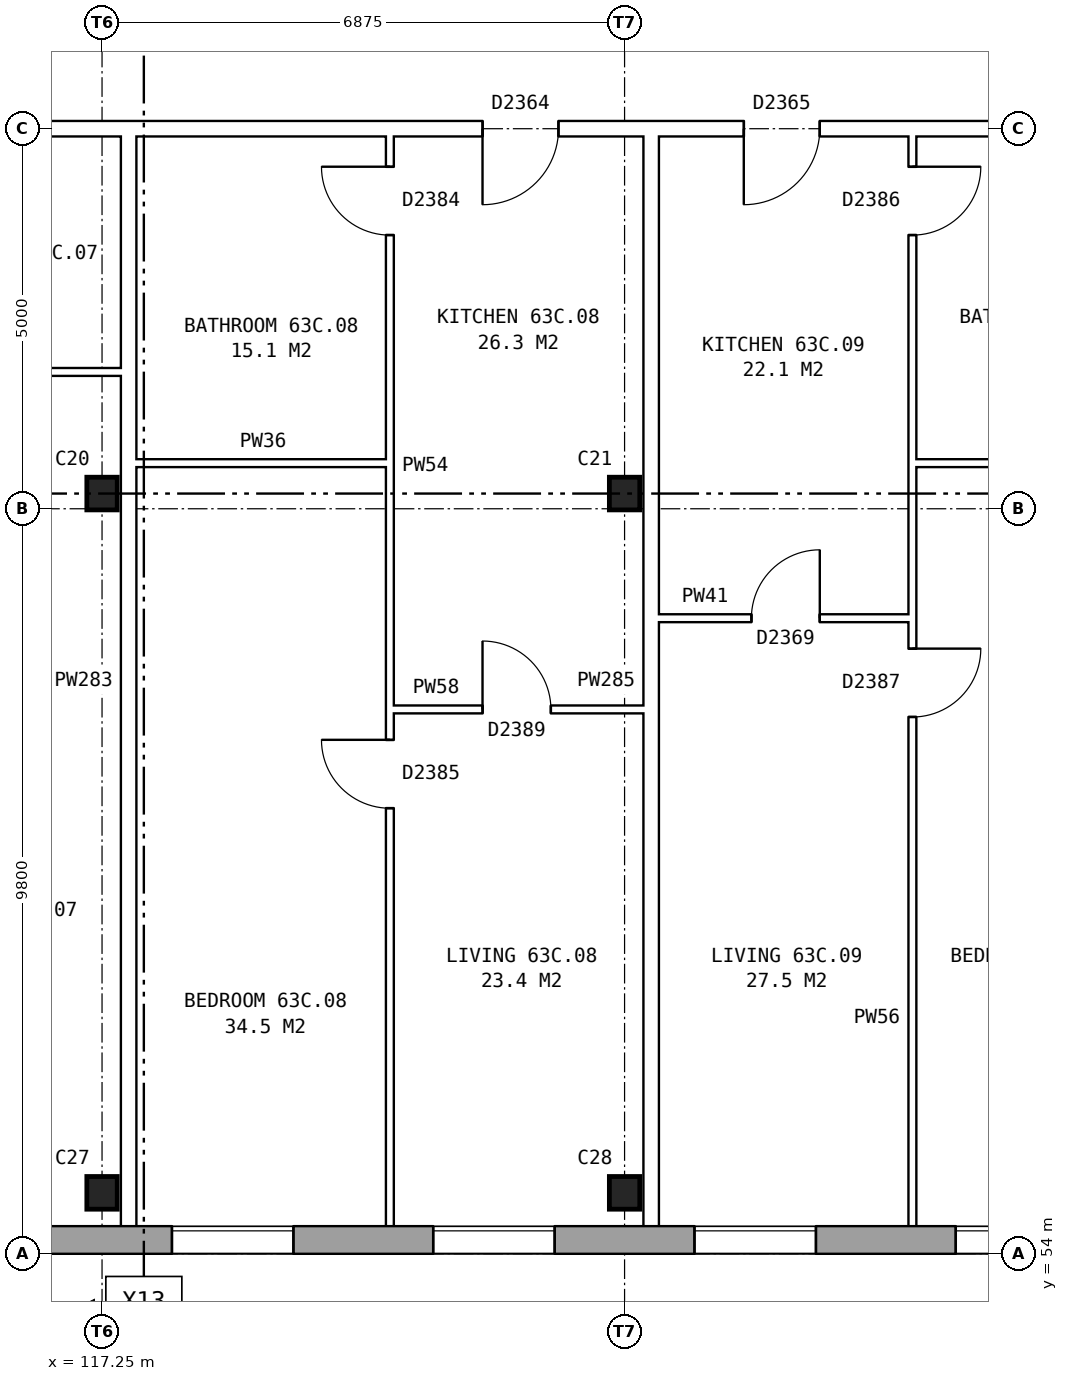
"""IFC4 building model, lengths in metres.
Left out: names, types, materials, properties, quantities, classifications, styles, units other than length and angle.
Written with IfcOpenShell. Run it as: python <this file> out.ifc"""

import sys

from ifc_helpers import new_model, si_unit, direction, frame, frame_2d, origin, origin_2d, place, context, subcontext, project, spatial, rectangle, i_section, extrude, element, fill, save


model = new_model("IFC4")
c1 = context("Model", 3, precision=1e-05, world=origin(), true_north=direction((0.0, 1.0)))
c2 = subcontext(c1, "Body", "Model", "MODEL_VIEW")
j1 = project(units=[si_unit("LENGTHUNIT", "METRE"), si_unit("PLANEANGLEUNIT", "RADIAN")], contexts=[c1])
p1 = place(None, origin())
s1 = spatial("IfcSite", under=j1, at=p1, CompositionType="ELEMENT")
p2 = place(p1, origin())
s2 = spatial("IfcBuilding", under=s1, at=p2, CompositionType="ELEMENT")
p3 = place(p2, frame((0.0, 0.0, 224.5)))
s3 = spatial("IfcBuildingStorey", under=s2, at=p3, CompositionType="ELEMENT", Elevation=224.5)
for number, where, z_axis, x_axis in (
    (1, (117.25, 54.8, 0.0), (0.0, 0.0, 1.0), (1.0, 0.0, 0.0)),
    (2, (124.125, 54.8, 0.0), (0.0, 0.0, 1.0), (1.0, 0.0, 0.0)),
    (3, (117.25, 64.0, 0.0), (0.0, 0.0, 1.0), (1.0, 0.0, 0.0)),
    (4, (124.125, 64.0, 0.0), (0.0, 0.0, 1.0), (1.0, 0.0, 0.0)),
):
    element("IfcColumn", number, at=place(p3, frame(where, z_axis=z_axis, x_axis=x_axis)), inside=s3, PredefinedType="COLUMN", context=c2, shape_type="SweptSolid", body=[
        extrude(i_section(OverallWidth=0.4, OverallDepth=0.43, WebThickness=0.04, FlangeThickness=0.04, at=origin_2d()), origin(), (0.0, 0.0, 1.0), 2.85),
    ])
p4 = place(p3, frame((75.95, 54.18, 0.0), z_axis=(0.0, 0.0, 1.0), x_axis=(1.0, 0.0, 0.0)))
e5 = element("IfcWall", 5, at=p4, inside=s3, PredefinedType="STANDARD", context=c2, shape_type="SweptSolid", body=[
    extrude(rectangle(XDim=55.1, YDim=0.36, at=frame_2d((27.55, 0.0))), origin(), (0.0, 0.0, 1.0), 2.85),
])
p5 = place(p4, frame((0.969, 0.0, 0.8)))
e6 = element("IfcOpeningElement", 6, at=p5, cuts=e5, PredefinedType="OPENING", context=c2, shape_type="SweptSolid", body=[
    extrude(rectangle(XDim=1.6, YDim=1.8, at=frame_2d((0.8, 0.9))), frame((0.0, 0.19, 0.0), z_axis=(0.0, -1.0, 0.0), x_axis=(1.0, 0.0, 0.0)), (0.0, 0.0, 1.0), 0.38),
])
p6 = place(p4, frame((4.406, 0.0, 0.8)))
e7 = element("IfcOpeningElement", 7, at=p6, cuts=e5, PredefinedType="OPENING", context=c2, shape_type="SweptSolid", body=[
    extrude(rectangle(XDim=1.6, YDim=1.8, at=frame_2d((0.8, 0.9))), frame((0.0, 0.19, 0.0), z_axis=(0.0, -1.0, 0.0), x_axis=(1.0, 0.0, 0.0)), (0.0, 0.0, 1.0), 0.38),
])
p7 = place(p4, frame((7.844, 0.0, 0.8)))
e8 = element("IfcOpeningElement", 8, at=p7, cuts=e5, PredefinedType="OPENING", context=c2, shape_type="SweptSolid", body=[
    extrude(rectangle(XDim=1.6, YDim=1.8, at=frame_2d((0.8, 0.9))), frame((0.0, 0.19, 0.0), z_axis=(0.0, -1.0, 0.0), x_axis=(1.0, 0.0, 0.0)), (0.0, 0.0, 1.0), 0.38),
])
p8 = place(p4, frame((11.281, 0.0, 0.8)))
e9 = element("IfcOpeningElement", 9, at=p8, cuts=e5, PredefinedType="OPENING", context=c2, shape_type="SweptSolid", body=[
    extrude(rectangle(XDim=1.6, YDim=1.8, at=frame_2d((0.8, 0.9))), frame((0.0, 0.19, 0.0), z_axis=(0.0, -1.0, 0.0), x_axis=(1.0, 0.0, 0.0)), (0.0, 0.0, 1.0), 0.38),
])
p9 = place(p4, frame((14.719, 0.0, 0.8)))
e10 = element("IfcOpeningElement", 10, at=p9, cuts=e5, PredefinedType="OPENING", context=c2, shape_type="SweptSolid", body=[
    extrude(rectangle(XDim=1.6, YDim=1.8, at=frame_2d((0.8, 0.9))), frame((0.0, 0.19, 0.0), z_axis=(0.0, -1.0, 0.0), x_axis=(1.0, 0.0, 0.0)), (0.0, 0.0, 1.0), 0.38),
])
p10 = place(p4, frame((18.156, 0.0, 0.8)))
e11 = element("IfcOpeningElement", 11, at=p10, cuts=e5, PredefinedType="OPENING", context=c2, shape_type="SweptSolid", body=[
    extrude(rectangle(XDim=1.6, YDim=1.8, at=frame_2d((0.8, 0.9))), frame((0.0, 0.19, 0.0), z_axis=(0.0, -1.0, 0.0), x_axis=(1.0, 0.0, 0.0)), (0.0, 0.0, 1.0), 0.38),
])
p11 = place(p4, frame((21.594, 0.0, 0.8)))
e12 = element("IfcOpeningElement", 12, at=p11, cuts=e5, PredefinedType="OPENING", context=c2, shape_type="SweptSolid", body=[
    extrude(rectangle(XDim=1.6, YDim=1.8, at=frame_2d((0.8, 0.9))), frame((0.0, 0.19, 0.0), z_axis=(0.0, -1.0, 0.0), x_axis=(1.0, 0.0, 0.0)), (0.0, 0.0, 1.0), 0.38),
])
p12 = place(p4, frame((25.031, 0.0, 0.8)))
e13 = element("IfcOpeningElement", 13, at=p12, cuts=e5, PredefinedType="OPENING", context=c2, shape_type="SweptSolid", body=[
    extrude(rectangle(XDim=1.6, YDim=1.8, at=frame_2d((0.8, 0.9))), frame((0.0, 0.19, 0.0), z_axis=(0.0, -1.0, 0.0), x_axis=(1.0, 0.0, 0.0)), (0.0, 0.0, 1.0), 0.38),
])
p13 = place(p4, frame((28.469, 0.0, 0.8)))
e14 = element("IfcOpeningElement", 14, at=p13, cuts=e5, PredefinedType="OPENING", context=c2, shape_type="SweptSolid", body=[
    extrude(rectangle(XDim=1.6, YDim=1.8, at=frame_2d((0.8, 0.9))), frame((0.0, 0.19, 0.0), z_axis=(0.0, -1.0, 0.0), x_axis=(1.0, 0.0, 0.0)), (0.0, 0.0, 1.0), 0.38),
])
p14 = place(p4, frame((31.906, 0.0, 0.8)))
e15 = element("IfcOpeningElement", 15, at=p14, cuts=e5, PredefinedType="OPENING", context=c2, shape_type="SweptSolid", body=[
    extrude(rectangle(XDim=1.6, YDim=1.8, at=frame_2d((0.8, 0.9))), frame((0.0, 0.19, 0.0), z_axis=(0.0, -1.0, 0.0), x_axis=(1.0, 0.0, 0.0)), (0.0, 0.0, 1.0), 0.38),
])
p15 = place(p4, frame((35.344, 0.0, 0.8)))
e16 = element("IfcOpeningElement", 16, at=p15, cuts=e5, PredefinedType="OPENING", context=c2, shape_type="SweptSolid", body=[
    extrude(rectangle(XDim=1.6, YDim=1.8, at=frame_2d((0.8, 0.9))), frame((0.0, 0.19, 0.0), z_axis=(0.0, -1.0, 0.0), x_axis=(1.0, 0.0, 0.0)), (0.0, 0.0, 1.0), 0.38),
])
p16 = place(p4, frame((38.781, 0.0, 0.8)))
e17 = element("IfcOpeningElement", 17, at=p16, cuts=e5, PredefinedType="OPENING", context=c2, shape_type="SweptSolid", body=[
    extrude(rectangle(XDim=1.6, YDim=1.8, at=frame_2d((0.8, 0.9))), frame((0.0, 0.19, 0.0), z_axis=(0.0, -1.0, 0.0), x_axis=(1.0, 0.0, 0.0)), (0.0, 0.0, 1.0), 0.38),
])
p17 = place(p4, frame((42.219, 0.0, 0.8)))
e18 = element("IfcOpeningElement", 18, at=p17, cuts=e5, PredefinedType="OPENING", context=c2, shape_type="SweptSolid", body=[
    extrude(rectangle(XDim=1.6, YDim=1.8, at=frame_2d((0.8, 0.9))), frame((0.0, 0.19, 0.0), z_axis=(0.0, -1.0, 0.0), x_axis=(1.0, 0.0, 0.0)), (0.0, 0.0, 1.0), 0.38),
])
p18 = place(p4, frame((45.656, 0.0, 0.8)))
e19 = element("IfcOpeningElement", 19, at=p18, cuts=e5, PredefinedType="OPENING", context=c2, shape_type="SweptSolid", body=[
    extrude(rectangle(XDim=1.6, YDim=1.8, at=frame_2d((0.8, 0.9))), frame((0.0, 0.19, 0.0), z_axis=(0.0, -1.0, 0.0), x_axis=(1.0, 0.0, 0.0)), (0.0, 0.0, 1.0), 0.38),
])
p19 = place(p4, frame((49.094, 0.0, 0.8)))
e20 = element("IfcOpeningElement", 20, at=p19, cuts=e5, PredefinedType="OPENING", context=c2, shape_type="SweptSolid", body=[
    extrude(rectangle(XDim=1.6, YDim=1.8, at=frame_2d((0.8, 0.9))), frame((0.0, 0.19, 0.0), z_axis=(0.0, -1.0, 0.0), x_axis=(1.0, 0.0, 0.0)), (0.0, 0.0, 1.0), 0.38),
])
p20 = place(p4, frame((52.531, 0.0, 0.8)))
e21 = element("IfcOpeningElement", 21, at=p20, cuts=e5, PredefinedType="OPENING", context=c2, shape_type="SweptSolid", body=[
    extrude(rectangle(XDim=1.6, YDim=1.8, at=frame_2d((0.8, 0.9))), frame((0.0, 0.19, 0.0), z_axis=(0.0, -1.0, 0.0), x_axis=(1.0, 0.0, 0.0)), (0.0, 0.0, 1.0), 0.38),
])
p21 = place(p3, frame((121.037, 61.16, 0.0), z_axis=(0.0, 0.0, 1.0), x_axis=(1.0, 0.0, 0.0)))
e22 = element("IfcWall", 22, at=p21, inside=s3, PredefinedType="PARTITIONING", context=c2, shape_type="SweptSolid", body=[
    extrude(rectangle(XDim=3.338, YDim=0.1, at=frame_2d((1.669, 0.0))), origin(), (0.0, 0.0, 1.0), 2.85),
])
p22 = place(p21, frame((1.219, 0.0, 0.0)))
e23 = element("IfcOpeningElement", 23, at=p22, cuts=e22, PredefinedType="OPENING", context=c2, shape_type="SweptSolid", body=[
    extrude(rectangle(XDim=0.9, YDim=2.1, at=frame_2d((0.45, 1.05))), frame((0.0, 0.06, 0.0), z_axis=(0.0, -1.0, 0.0), x_axis=(1.0, 0.0, 0.0)), (0.0, 0.0, 1.0), 0.12),
])
p23 = place(p3, frame((124.575, 62.36, 0.0), z_axis=(0.0, 0.0, 1.0), x_axis=(1.0, 0.0, 0.0)))
e24 = element("IfcWall", 24, at=p23, inside=s3, PredefinedType="PARTITIONING", context=c2, shape_type="SweptSolid", body=[
    extrude(rectangle(XDim=3.337, YDim=0.1, at=frame_2d((1.668, 0.0))), origin(), (0.0, 0.0, 1.0), 2.85),
])
p24 = place(p23, frame((1.219, 0.0, 0.0)))
e25 = element("IfcOpeningElement", 25, at=p24, cuts=e24, PredefinedType="OPENING", context=c2, shape_type="SweptSolid", body=[
    extrude(rectangle(XDim=0.9, YDim=2.1, at=frame_2d((0.45, 1.05))), frame((0.0, 0.06, 0.0), z_axis=(0.0, -1.0, 0.0), x_axis=(1.0, 0.0, 0.0)), (0.0, 0.0, 1.0), 0.12),
])
p25 = place(p3, frame((117.7, 64.4, 0.0), z_axis=(0.0, 0.0, 1.0), x_axis=(1.0, 0.0, 0.0)))
e26 = element("IfcWall", 26, at=p25, inside=s3, PredefinedType="PARTITIONING", context=c2, shape_type="SweptSolid", body=[
    extrude(rectangle(XDim=3.337, YDim=0.1, at=frame_2d((1.668, 0.0))), origin(), (0.0, 0.0, 1.0), 2.85),
])
p26 = place(p3, frame((127.912, 64.4, 0.0), z_axis=(0.0, 0.0, 1.0), x_axis=(1.0, 0.0, 0.0)))
e27 = element("IfcWall", 27, at=p26, inside=s3, PredefinedType="PARTITIONING", context=c2, shape_type="SweptSolid", body=[
    extrude(rectangle(XDim=3.448, YDim=0.1, at=frame_2d((1.724, 0.0))), origin(), (0.0, 0.0, 1.0), 2.85),
])
p27 = place(p3, frame((114.162, 65.6, 0.0), z_axis=(0.0, 0.0, 1.0), x_axis=(1.0, 0.0, 0.0)))
e28 = element("IfcWall", 28, at=p27, inside=s3, PredefinedType="PARTITIONING", context=c2, shape_type="SweptSolid", body=[
    extrude(rectangle(XDim=3.338, YDim=0.1, at=frame_2d((1.669, 0.0))), origin(), (0.0, 0.0, 1.0), 2.85),
])
p28 = place(p3, frame((75.64, 68.8, 0.0), z_axis=(0.0, 0.0, 1.0), x_axis=(1.0, 0.0, 0.0)))
e29 = element("IfcWall", 29, at=p28, inside=s3, PredefinedType="PARTITIONING", context=c2, shape_type="SweptSolid", body=[
    extrude(rectangle(XDim=55.72, YDim=0.2, at=frame_2d((27.86, 0.0))), origin(), (0.0, 0.0, 1.0), 2.85),
])
p29 = place(p28, frame((1.399, 0.0, 0.0)))
e30 = element("IfcOpeningElement", 30, at=p29, cuts=e29, PredefinedType="OPENING", context=c2, shape_type="SweptSolid", body=[
    extrude(rectangle(XDim=1.0, YDim=2.1, at=frame_2d((0.5, 1.05))), frame((0.0, 0.11, 0.0), z_axis=(0.0, -1.0, 0.0), x_axis=(1.0, 0.0, 0.0)), (0.0, 0.0, 1.0), 0.22),
])
p30 = place(p28, frame((12.241, 0.0, 0.0)))
e31 = element("IfcOpeningElement", 31, at=p30, cuts=e29, PredefinedType="OPENING", context=c2, shape_type="SweptSolid", body=[
    extrude(rectangle(XDim=1.0, YDim=2.1, at=frame_2d((0.5, 1.05))), frame((0.0, 0.11, 0.0), z_axis=(0.0, -1.0, 0.0), x_axis=(1.0, 0.0, 0.0)), (0.0, 0.0, 1.0), 0.22),
])
p31 = place(p28, frame((22.553, 0.0, 0.0)))
e32 = element("IfcOpeningElement", 32, at=p31, cuts=e29, PredefinedType="OPENING", context=c2, shape_type="SweptSolid", body=[
    extrude(rectangle(XDim=1.0, YDim=2.1, at=frame_2d((0.5, 1.05))), frame((0.0, 0.11, 0.0), z_axis=(0.0, -1.0, 0.0), x_axis=(1.0, 0.0, 0.0)), (0.0, 0.0, 1.0), 0.22),
])
p32 = place(p28, frame((32.866, 0.0, 0.0)))
e33 = element("IfcOpeningElement", 33, at=p32, cuts=e29, PredefinedType="OPENING", context=c2, shape_type="SweptSolid", body=[
    extrude(rectangle(XDim=1.0, YDim=2.1, at=frame_2d((0.5, 1.05))), frame((0.0, 0.11, 0.0), z_axis=(0.0, -1.0, 0.0), x_axis=(1.0, 0.0, 0.0)), (0.0, 0.0, 1.0), 0.22),
])
p33 = place(p28, frame((36.303, 0.0, 0.0)))
e34 = element("IfcOpeningElement", 34, at=p33, cuts=e29, PredefinedType="OPENING", context=c2, shape_type="SweptSolid", body=[
    extrude(rectangle(XDim=1.0, YDim=2.1, at=frame_2d((0.5, 1.05))), frame((0.0, 0.11, 0.0), z_axis=(0.0, -1.0, 0.0), x_axis=(1.0, 0.0, 0.0)), (0.0, 0.0, 1.0), 0.22),
])
p34 = place(p28, frame((46.616, 0.0, 0.0)))
e35 = element("IfcOpeningElement", 35, at=p34, cuts=e29, PredefinedType="OPENING", context=c2, shape_type="SweptSolid", body=[
    extrude(rectangle(XDim=1.0, YDim=2.1, at=frame_2d((0.5, 1.05))), frame((0.0, 0.11, 0.0), z_axis=(0.0, -1.0, 0.0), x_axis=(1.0, 0.0, 0.0)), (0.0, 0.0, 1.0), 0.22),
])
p35 = place(p28, frame((50.053, 0.0, 0.0)))
e36 = element("IfcOpeningElement", 36, at=p35, cuts=e29, PredefinedType="OPENING", context=c2, shape_type="SweptSolid", body=[
    extrude(rectangle(XDim=1.0, YDim=2.1, at=frame_2d((0.5, 1.05))), frame((0.0, 0.11, 0.0), z_axis=(0.0, -1.0, 0.0), x_axis=(1.0, 0.0, 0.0)), (0.0, 0.0, 1.0), 0.22),
])
p36 = place(p3, frame((117.6, 54.36, 0.0), z_axis=(0.0, 0.0, 1.0), x_axis=(0.0, 1.0, 0.0)))
e37 = element("IfcWall", 37, at=p36, inside=s3, PredefinedType="PARTITIONING", context=c2, shape_type="SweptSolid", body=[
    extrude(rectangle(XDim=14.34, YDim=0.2, at=frame_2d((7.17, 0.0))), origin(), (0.0, 0.0, 1.0), 2.85),
])
p37 = place(p3, frame((121.037, 54.36, 0.0), z_axis=(0.0, 0.0, 1.0), x_axis=(0.0, 1.0, 0.0)))
e38 = element("IfcWall", 38, at=p37, inside=s3, PredefinedType="PARTITIONING", context=c2, shape_type="SweptSolid", body=[
    extrude(rectangle(XDim=14.34, YDim=0.1, at=frame_2d((7.17, 0.0))), origin(), (0.0, 0.0, 1.0), 2.85),
])
p38 = place(p37, frame((5.5, 0.0, 0.0)))
e39 = element("IfcOpeningElement", 39, at=p38, cuts=e38, PredefinedType="OPENING", context=c2, shape_type="SweptSolid", body=[
    extrude(rectangle(XDim=0.9, YDim=2.1, at=frame_2d((0.45, 1.05))), frame((0.0, 0.06, 0.0), z_axis=(0.0, -1.0, 0.0), x_axis=(1.0, 0.0, 0.0)), (0.0, 0.0, 1.0), 0.12),
])
p39 = place(p37, frame((13.04, 0.0, 0.0)))
e40 = element("IfcOpeningElement", 40, at=p39, cuts=e38, PredefinedType="OPENING", context=c2, shape_type="SweptSolid", body=[
    extrude(rectangle(XDim=0.9, YDim=2.1, at=frame_2d((0.45, 1.05))), frame((0.0, 0.06, 0.0), z_axis=(0.0, -1.0, 0.0), x_axis=(1.0, 0.0, 0.0)), (0.0, 0.0, 1.0), 0.12),
])
p40 = place(p3, frame((124.475, 54.36, 0.0), z_axis=(0.0, 0.0, 1.0), x_axis=(0.0, 1.0, 0.0)))
e41 = element("IfcWall", 41, at=p40, inside=s3, PredefinedType="PARTITIONING", context=c2, shape_type="SweptSolid", body=[
    extrude(rectangle(XDim=14.34, YDim=0.2, at=frame_2d((7.17, 0.0))), origin(), (0.0, 0.0, 1.0), 2.85),
])
p41 = place(p3, frame((127.912, 54.36, 0.0), z_axis=(0.0, 0.0, 1.0), x_axis=(0.0, 1.0, 0.0)))
e42 = element("IfcWall", 42, at=p41, inside=s3, PredefinedType="PARTITIONING", context=c2, shape_type="SweptSolid", body=[
    extrude(rectangle(XDim=14.34, YDim=0.1, at=frame_2d((7.17, 0.0))), origin(), (0.0, 0.0, 1.0), 2.85),
])
p42 = place(p41, frame((6.7, 0.0, 0.0)))
e43 = element("IfcOpeningElement", 43, at=p42, cuts=e42, PredefinedType="OPENING", context=c2, shape_type="SweptSolid", body=[
    extrude(rectangle(XDim=0.9, YDim=2.1, at=frame_2d((0.45, 1.05))), frame((0.0, 0.06, 0.0), z_axis=(0.0, -1.0, 0.0), x_axis=(1.0, 0.0, 0.0)), (0.0, 0.0, 1.0), 0.12),
])
p43 = place(p41, frame((13.04, 0.0, 0.0)))
e44 = element("IfcOpeningElement", 44, at=p43, cuts=e42, PredefinedType="OPENING", context=c2, shape_type="SweptSolid", body=[
    extrude(rectangle(XDim=0.9, YDim=2.1, at=frame_2d((0.45, 1.05))), frame((0.0, 0.06, 0.0), z_axis=(0.0, -1.0, 0.0), x_axis=(1.0, 0.0, 0.0)), (0.0, 0.0, 1.0), 0.12),
])
p44 = place(p17, origin())
e45 = element("IfcWindow", 45, at=p44, inside=s3, PartitioningType="SINGLE_PANEL", PredefinedType="WINDOW", context=c2, shape_type="SweptSolid", body=[
    extrude(rectangle(XDim=1.6, YDim=1.8, at=frame_2d((0.8, 0.9))), frame((0.0, 0.15, 0.0), z_axis=(0.0, -1.0, 0.0), x_axis=(1.0, 0.0, 0.0)), (0.0, 0.0, 1.0), 0.06),
])
fill(e18, e45)
p45 = place(p18, origin())
e46 = element("IfcWindow", 46, at=p45, inside=s3, PartitioningType="SINGLE_PANEL", PredefinedType="WINDOW", context=c2, shape_type="SweptSolid", body=[
    extrude(rectangle(XDim=1.6, YDim=1.8, at=frame_2d((0.8, 0.9))), frame((0.0, 0.15, 0.0), z_axis=(0.0, -1.0, 0.0), x_axis=(1.0, 0.0, 0.0)), (0.0, 0.0, 1.0), 0.06),
])
fill(e19, e46)
p46 = place(p19, origin())
e47 = element("IfcWindow", 47, at=p46, inside=s3, PartitioningType="SINGLE_PANEL", PredefinedType="WINDOW", context=c2, shape_type="SweptSolid", body=[
    extrude(rectangle(XDim=1.6, YDim=1.8, at=frame_2d((0.8, 0.9))), frame((0.0, 0.15, 0.0), z_axis=(0.0, -1.0, 0.0), x_axis=(1.0, 0.0, 0.0)), (0.0, 0.0, 1.0), 0.06),
])
fill(e20, e47)
p47 = place(p20, origin())
e48 = element("IfcWindow", 48, at=p47, inside=s3, PartitioningType="SINGLE_PANEL", PredefinedType="WINDOW", context=c2, shape_type="SweptSolid", body=[
    extrude(rectangle(XDim=1.6, YDim=1.8, at=frame_2d((0.8, 0.9))), frame((0.0, 0.15, 0.0), z_axis=(0.0, -1.0, 0.0), x_axis=(1.0, 0.0, 0.0)), (0.0, 0.0, 1.0), 0.06),
])
fill(e21, e48)
p48 = place(p38, origin())
e49 = element("IfcDoor", 49, at=p48, inside=s3, OperationType="SINGLE_SWING_RIGHT", PredefinedType="DOOR", context=c2, shape_type="SweptSolid", body=[
    extrude(rectangle(XDim=0.9, YDim=2.1, at=frame_2d((0.45, 1.05))), frame((0.0, 0.025, 0.0), z_axis=(0.0, -1.0, 0.0), x_axis=(1.0, 0.0, 0.0)), (0.0, 0.0, 1.0), 0.05),
])
fill(e39, e49)
p49 = place(p34, frame((1.0, 0.0, 0.0), z_axis=(0.0, 0.0, 1.0), x_axis=(-1.0, 0.0, 0.0)))
e50 = element("IfcDoor", 50, at=p49, inside=s3, OperationType="SINGLE_SWING_RIGHT", PredefinedType="DOOR", context=c2, shape_type="SweptSolid", body=[
    extrude(rectangle(XDim=1.0, YDim=2.1, at=frame_2d((0.5, 1.05))), frame((0.0, 0.025, 0.0), z_axis=(0.0, -1.0, 0.0), x_axis=(1.0, 0.0, 0.0)), (0.0, 0.0, 1.0), 0.05),
])
fill(e35, e50)
p50 = place(p22, origin())
e51 = element("IfcDoor", 51, at=p50, inside=s3, OperationType="SINGLE_SWING_LEFT", PredefinedType="DOOR", context=c2, shape_type="SweptSolid", body=[
    extrude(rectangle(XDim=0.9, YDim=2.1, at=frame_2d((0.45, 1.05))), frame((0.0, 0.025, 0.0), z_axis=(0.0, -1.0, 0.0), x_axis=(1.0, 0.0, 0.0)), (0.0, 0.0, 1.0), 0.05),
])
fill(e23, e51)
p51 = place(p39, origin())
e52 = element("IfcDoor", 52, at=p51, inside=s3, OperationType="SINGLE_SWING_RIGHT", PredefinedType="DOOR", context=c2, shape_type="SweptSolid", body=[
    extrude(rectangle(XDim=0.9, YDim=2.1, at=frame_2d((0.45, 1.05))), frame((0.0, 0.025, 0.0), z_axis=(0.0, -1.0, 0.0), x_axis=(1.0, 0.0, 0.0)), (0.0, 0.0, 1.0), 0.05),
])
fill(e40, e52)
p52 = place(p42, frame((0.9, 0.0, 0.0), z_axis=(0.0, 0.0, 1.0), x_axis=(-1.0, 0.0, 0.0)))
e53 = element("IfcDoor", 53, at=p52, inside=s3, OperationType="SINGLE_SWING_LEFT", PredefinedType="DOOR", context=c2, shape_type="SweptSolid", body=[
    extrude(rectangle(XDim=0.9, YDim=2.1, at=frame_2d((0.45, 1.05))), frame((0.0, 0.025, 0.0), z_axis=(0.0, -1.0, 0.0), x_axis=(1.0, 0.0, 0.0)), (0.0, 0.0, 1.0), 0.05),
])
fill(e43, e53)
p53 = place(p35, frame((1.0, 0.0, 0.0), z_axis=(0.0, 0.0, 1.0), x_axis=(-1.0, 0.0, 0.0)))
e54 = element("IfcDoor", 54, at=p53, inside=s3, OperationType="SINGLE_SWING_RIGHT", PredefinedType="DOOR", context=c2, shape_type="SweptSolid", body=[
    extrude(rectangle(XDim=1.0, YDim=2.1, at=frame_2d((0.5, 1.05))), frame((0.0, 0.025, 0.0), z_axis=(0.0, -1.0, 0.0), x_axis=(1.0, 0.0, 0.0)), (0.0, 0.0, 1.0), 0.05),
])
fill(e36, e54)
p54 = place(p24, origin())
e55 = element("IfcDoor", 55, at=p54, inside=s3, OperationType="SINGLE_SWING_RIGHT", PredefinedType="DOOR", context=c2, shape_type="SweptSolid", body=[
    extrude(rectangle(XDim=0.9, YDim=2.1, at=frame_2d((0.45, 1.05))), frame((0.0, 0.025, 0.0), z_axis=(0.0, -1.0, 0.0), x_axis=(1.0, 0.0, 0.0)), (0.0, 0.0, 1.0), 0.05),
])
fill(e25, e55)
p55 = place(p43, frame((0.9, 0.0, 0.0), z_axis=(0.0, 0.0, 1.0), x_axis=(-1.0, 0.0, 0.0)))
e56 = element("IfcDoor", 56, at=p55, inside=s3, OperationType="SINGLE_SWING_LEFT", PredefinedType="DOOR", context=c2, shape_type="SweptSolid", body=[
    extrude(rectangle(XDim=0.9, YDim=2.1, at=frame_2d((0.45, 1.05))), frame((0.0, 0.025, 0.0), z_axis=(0.0, -1.0, 0.0), x_axis=(1.0, 0.0, 0.0)), (0.0, 0.0, 1.0), 0.05),
])
fill(e44, e56)
save(model, sys.argv[1])
